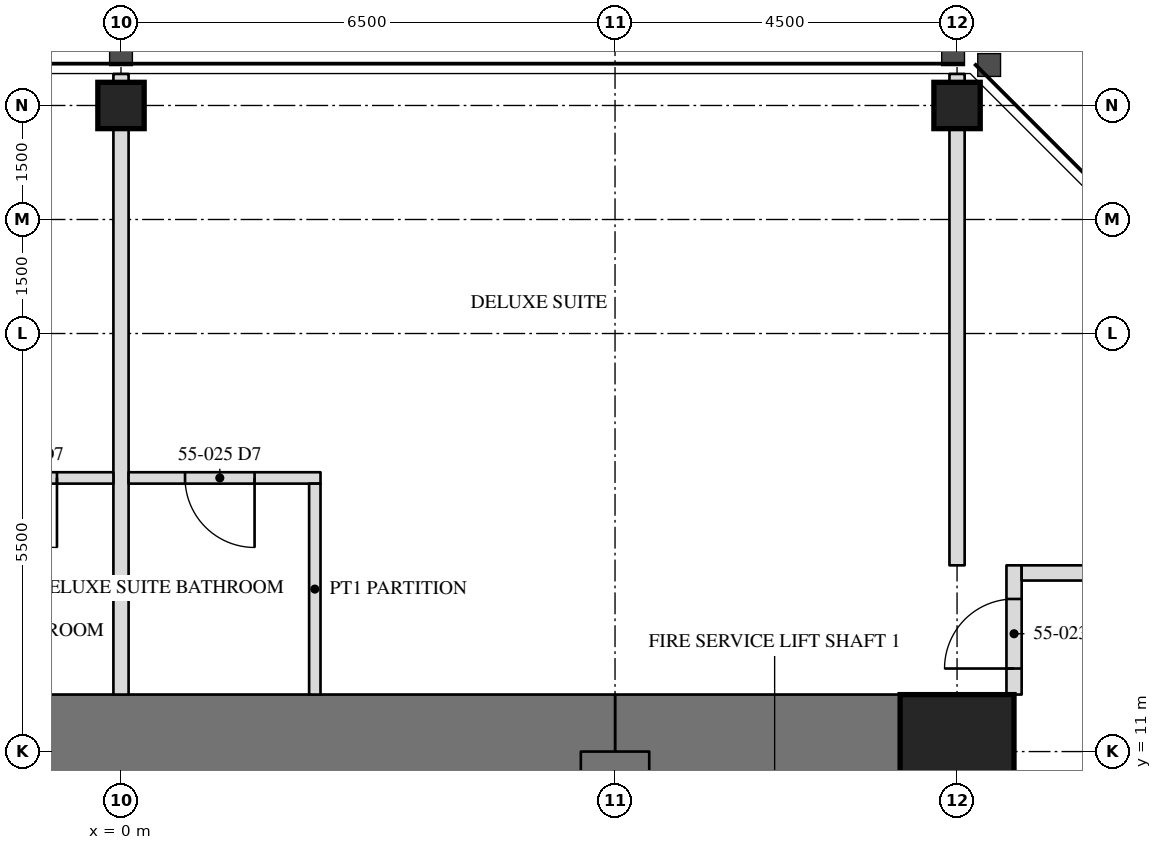
"""IFC4 building model, lengths in metres.
Left out: names, types, materials, properties, quantities, classifications, styles, units other than length and angle.
Written with IfcOpenShell. Run it as: python <this file> out.ifc"""

import sys

from ifc_helpers import new_model, si_unit, direction, frame, frame_2d, origin, origin_2d, place, context, subcontext, project, spatial, rectangle, hollow_rectangle, extrude, element, fill, save


model = new_model("IFC4")
c1 = context("Model", 3, precision=1e-05, world=origin(), true_north=direction((0.0, 1.0)))
c2 = subcontext(c1, "Body", "Model", "MODEL_VIEW")
j1 = project(units=[si_unit("LENGTHUNIT", "METRE"), si_unit("PLANEANGLEUNIT", "RADIAN")], contexts=[c1])
p1 = place(None, origin())
s1 = spatial("IfcSite", under=j1, at=p1, CompositionType="ELEMENT")
p2 = place(p1, origin())
s2 = spatial("IfcBuilding", under=s1, at=p2, CompositionType="ELEMENT")
p3 = place(p2, frame((0.0, 0.0, 229.2)))
s3 = spatial("IfcBuildingStorey", under=s2, at=p3, CompositionType="ELEMENT", Elevation=229.2)
for number, where, z_axis, x_axis in (
    (1, (11.0, 19.5, 0.0), (0.0, 0.0, 1.0), (1.0, 0.0, 0.0)),
    (2, (0.0, 19.5, 0.0), (0.0, 0.0, 1.0), (1.0, 0.0, 0.0)),
):
    element("IfcColumn", number, at=place(p3, frame(where, z_axis=z_axis, x_axis=x_axis)), inside=s3, PredefinedType="COLUMN", context=c2, shape_type="SweptSolid", body=[
        extrude(hollow_rectangle(XDim=0.61, YDim=0.61, WallThickness=0.076, at=origin_2d()), origin(), (0.0, 0.0, 1.0), 3.5),
    ])
p4 = place(p3, frame((11.0, -11.0, 0.0), z_axis=(0.0, 0.0, 1.0), x_axis=(0.0, 1.0, 0.0)))
e3 = element("IfcWall", 3, at=p4, inside=s3, PredefinedType="SHEAR", context=c2, shape_type="SweptSolid", body=[
    extrude(rectangle(XDim=22.0, YDim=1.5, at=frame_2d((11.0, 0.0))), origin(), (0.0, 0.0, 1.0), 3.5),
])
p5 = place(p4, frame((15.393, 0.0, 0.0)))
e4 = element("IfcOpeningElement", 4, at=p5, cuts=e3, PredefinedType="OPENING", context=c2, shape_type="SweptSolid", body=[
    extrude(rectangle(XDim=0.915, YDim=2.134, at=frame_2d((0.458, 1.067))), frame((0.0, 0.76, 0.0), z_axis=(0.0, -1.0, 0.0), x_axis=(1.0, 0.0, 0.0)), (0.0, 0.0, 1.0), 1.52),
])
p6 = place(p3, frame((11.0, 11.0, 0.0), z_axis=(0.0, 0.0, 1.0), x_axis=(-1.0, 0.0, 0.0)))
e5 = element("IfcWall", 5, at=p6, inside=s3, PredefinedType="SHEAR", context=c2, shape_type="SweptSolid", body=[
    extrude(rectangle(XDim=4.5, YDim=1.5, at=frame_2d((2.25, 0.0))), origin(), (0.0, 0.0, 1.0), 3.5),
])
p7 = place(p3, frame((6.5, 11.0, 0.0), z_axis=(0.0, 0.0, 1.0), x_axis=(-1.0, 0.0, 0.0)))
e6 = element("IfcWall", 6, at=p7, inside=s3, PredefinedType="SHEAR", context=c2, shape_type="SweptSolid", body=[
    extrude(rectangle(XDim=13.0, YDim=1.5, at=frame_2d((6.5, 0.0))), origin(), (0.0, 0.0, 1.0), 3.5),
])
p8 = place(p3, frame((6.5, 6.5, 0.0), z_axis=(0.0, 0.0, 1.0), x_axis=(0.0, 1.0, 0.0)))
e7 = element("IfcWall", 7, at=p8, inside=s3, PredefinedType="SHEAR", context=c2, shape_type="SweptSolid", body=[
    extrude(rectangle(XDim=4.5, YDim=0.9, at=frame_2d((2.25, 0.0))), origin(), (0.0, 0.0, 1.0), 3.5),
])
p9 = place(p3, frame((11.0, 11.0, 0.0), z_axis=(0.0, 0.0, 1.0), x_axis=(1.0, 0.0, 0.0)))
e8 = element("IfcColumn", 8, at=p9, inside=s3, PredefinedType="COLUMN", context=c2, shape_type="SweptSolid", body=[
    extrude(hollow_rectangle(XDim=1.499, YDim=1.499, WallThickness=0.102, at=origin_2d()), origin(), (0.0, 0.0, 1.0), 3.5),
])
p10 = place(p3, frame((11.75, 11.75, 0.0), z_axis=(0.0, 0.0, 1.0), x_axis=(0.0, 1.0, 0.0)))
e9 = element("IfcWall", 9, at=p10, inside=s3, PredefinedType="PARTITIONING", context=c2, shape_type="SweptSolid", body=[
    extrude(rectangle(XDim=1.7, YDim=0.2, at=frame_2d((0.85, 0.0))), origin(), (0.0, 0.0, 1.0), 3.31),
])
p11 = place(p10, frame((0.343, 0.0, 0.0)))
e10 = element("IfcOpeningElement", 10, at=p11, cuts=e9, PredefinedType="OPENING", context=c2, shape_type="SweptSolid", body=[
    extrude(rectangle(XDim=0.915, YDim=2.134, at=frame_2d((0.458, 1.067))), frame((0.0, 0.11, 0.0), z_axis=(0.0, -1.0, 0.0), x_axis=(1.0, 0.0, 0.0)), (0.0, 0.0, 1.0), 0.22),
])
p12 = place(p3, frame((13.85, 13.35, 0.0), z_axis=(0.0, 0.0, 1.0), x_axis=(-1.0, 0.0, 0.0)))
e11 = element("IfcWall", 11, at=p12, inside=s3, PredefinedType="PARTITIONING", context=c2, shape_type="SweptSolid", body=[
    extrude(rectangle(XDim=2.0, YDim=0.2, at=frame_2d((1.0, 0.0))), origin(), (0.0, 0.0, 1.0), 3.31),
])
p13 = place(p3, frame((11.0, 13.45, 0.0), z_axis=(0.0, 0.0, 1.0), x_axis=(0.0, 1.0, 0.0)))
e12 = element("IfcWall", 12, at=p13, inside=s3, PredefinedType="PARTITIONING", context=c2, shape_type="SweptSolid", body=[
    extrude(rectangle(XDim=6.465, YDim=0.2, at=frame_2d((3.232, 0.0))), origin(), (0.0, 0.0, 1.0), 2.802),
])
p14 = place(p3, frame((0.0, 11.75, 0.0), z_axis=(0.0, 0.0, 1.0), x_axis=(0.0, 1.0, 0.0)))
e13 = element("IfcWall", 13, at=p14, inside=s3, PredefinedType="PARTITIONING", context=c2, shape_type="SweptSolid", body=[
    extrude(rectangle(XDim=8.165, YDim=0.2, at=frame_2d((4.083, 0.0))), origin(), (0.0, 0.0, 1.0), 2.802),
])
p15 = place(p3, frame((2.625, 14.6, 0.0), z_axis=(0.0, 0.0, 1.0), x_axis=(-1.0, 0.0, 0.0)))
e14 = element("IfcWall", 14, at=p15, inside=s3, PredefinedType="PARTITIONING", context=c2, shape_type="SweptSolid", body=[
    extrude(rectangle(XDim=2.525, YDim=0.15, at=frame_2d((1.262, 0.0))), origin(), (0.0, 0.0, 1.0), 3.31),
])
p16 = place(p15, frame((0.867, 0.0, 0.0)))
e15 = element("IfcOpeningElement", 15, at=p16, cuts=e14, PredefinedType="OPENING", context=c2, shape_type="SweptSolid", body=[
    extrude(rectangle(XDim=0.915, YDim=2.032, at=frame_2d((0.458, 1.016))), frame((0.0, 0.085, 0.0), z_axis=(0.0, -1.0, 0.0), x_axis=(1.0, 0.0, 0.0)), (0.0, 0.0, 1.0), 0.17),
])
p17 = place(p3, frame((2.55, 11.75, 0.0), z_axis=(0.0, 0.0, 1.0), x_axis=(0.0, 1.0, 0.0)))
e16 = element("IfcWall", 16, at=p17, inside=s3, PredefinedType="PARTITIONING", context=c2, shape_type="SweptSolid", body=[
    extrude(rectangle(XDim=2.775, YDim=0.15, at=frame_2d((1.387, 0.0))), origin(), (0.0, 0.0, 1.0), 3.31),
])
p18 = place(p3, frame((-0.1, 14.6, 0.0), z_axis=(0.0, 0.0, 1.0), x_axis=(-1.0, 0.0, 0.0)))
e17 = element("IfcWall", 17, at=p18, inside=s3, PredefinedType="PARTITIONING", context=c2, shape_type="SweptSolid", body=[
    extrude(rectangle(XDim=2.525, YDim=0.15, at=frame_2d((1.262, 0.0))), origin(), (0.0, 0.0, 1.0), 3.31),
])
p19 = place(p18, frame((0.742, 0.0, 0.0)))
e18 = element("IfcOpeningElement", 18, at=p19, cuts=e17, PredefinedType="OPENING", context=c2, shape_type="SweptSolid", body=[
    extrude(rectangle(XDim=0.915, YDim=2.032, at=frame_2d((0.458, 1.016))), frame((0.0, 0.085, 0.0), z_axis=(0.0, -1.0, 0.0), x_axis=(1.0, 0.0, 0.0)), (0.0, 0.0, 1.0), 0.17),
])
p20 = place(p11, origin())
e19 = element("IfcDoor", 19, at=p20, inside=s3, OperationType="SINGLE_SWING_LEFT", PredefinedType="DOOR", context=c2, shape_type="SweptSolid", body=[
    extrude(rectangle(XDim=0.915, YDim=2.134, at=frame_2d((0.458, 1.067))), frame((0.0, 0.025, 0.0), z_axis=(0.0, -1.0, 0.0), x_axis=(1.0, 0.0, 0.0)), (0.0, 0.0, 1.0), 0.05),
])
fill(e10, e19)
p21 = place(p16, origin())
e20 = element("IfcDoor", 20, at=p21, inside=s3, OperationType="SINGLE_SWING_LEFT", PredefinedType="DOOR", context=c2, shape_type="SweptSolid", body=[
    extrude(rectangle(XDim=0.915, YDim=2.032, at=frame_2d((0.458, 1.016))), frame((0.0, 0.025, 0.0), z_axis=(0.0, -1.0, 0.0), x_axis=(1.0, 0.0, 0.0)), (0.0, 0.0, 1.0), 0.05),
])
fill(e15, e20)
p22 = place(p19, origin())
e21 = element("IfcDoor", 21, at=p22, inside=s3, OperationType="SINGLE_SWING_LEFT", PredefinedType="DOOR", context=c2, shape_type="SweptSolid", body=[
    extrude(rectangle(XDim=0.915, YDim=2.032, at=frame_2d((0.458, 1.016))), frame((0.0, 0.025, 0.0), z_axis=(0.0, -1.0, 0.0), x_axis=(1.0, 0.0, 0.0)), (0.0, 0.0, 1.0), 0.05),
])
fill(e18, e21)
save(model, sys.argv[1])
